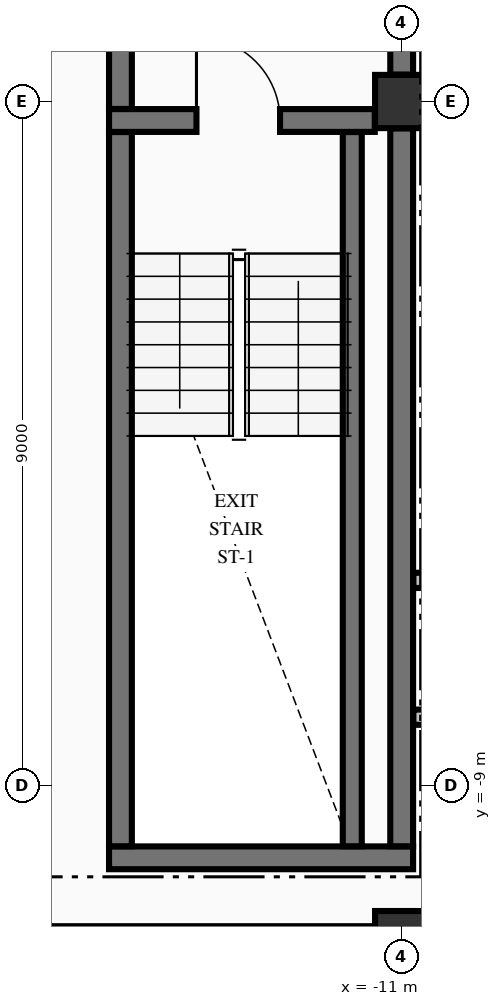
"""IFC4 building model, lengths in metres.
Left out: names, types, materials, properties, quantities, classifications, styles, units other than length and angle.
Written with IfcOpenShell. Run it as: python <this file> out.ifc"""

import sys

from ifc_helpers import new_model, si_unit, direction, frame, frame_2d, origin, origin_2d, place, context, subcontext, project, spatial, rectangle, extrude, element, fill, save


model = new_model("IFC4")
c1 = context("Model", 3, precision=1e-05, world=origin(), true_north=direction((0.0, 1.0)))
c2 = subcontext(c1, "Body", "Model", "MODEL_VIEW")
j1 = project(units=[si_unit("LENGTHUNIT", "METRE"), si_unit("PLANEANGLEUNIT", "RADIAN")], contexts=[c1])
p1 = place(None, origin())
s1 = spatial("IfcSite", under=j1, at=p1, CompositionType="ELEMENT")
p2 = place(p1, origin())
s2 = spatial("IfcBuilding", under=s1, at=p2, CompositionType="ELEMENT")
p3 = place(p2, frame((0.0, 0.0, 287.92)))
s3 = spatial("IfcBuildingStorey", under=s2, at=p3, CompositionType="ELEMENT", Elevation=287.92)
for number, where, z_axis, x_axis in (
    (1, (-11.0, -11.0, -0.325), (0.0, 0.0, 1.0), (1.0, 0.0, 0.0)),
    (2, (-11.0, 0.0, -0.325), (0.0, 0.0, 1.0), (1.0, 0.0, 0.0)),
):
    element("IfcColumn", number, at=place(p3, frame(where, z_axis=z_axis, x_axis=x_axis)), inside=s3, PredefinedType="COLUMN", context=c2, shape_type="SweptSolid", body=[
        extrude(rectangle(XDim=0.7, YDim=0.7, at=origin_2d()), origin(), (0.0, 0.0, 1.0), 3.06),
    ])
p4 = place(p3, frame((-16.62, -11.0, 0.0), z_axis=(0.0, 0.0, 1.0), x_axis=(1.0, 0.0, 0.0)))
e3 = element("IfcWall", 3, at=p4, inside=s3, PredefinedType="STANDARD", context=c2, shape_type="SweptSolid", body=[
    extrude(rectangle(XDim=5.24, YDim=0.3, at=frame_2d((2.62, 0.0))), origin(), (0.0, 0.0, 1.0), 1.077),
])
p5 = place(p3, frame((-14.85, -9.95, 0.0), z_axis=(0.0, 0.0, 1.0), x_axis=(1.0, 0.0, 0.0)))
e4 = element("IfcWall", 4, at=p5, inside=s3, PredefinedType="SHEAR", context=c2, shape_type="SweptSolid", body=[
    extrude(rectangle(XDim=4.0, YDim=0.3, at=frame_2d((2.0, 0.0))), origin(), (0.0, 0.0, 1.0), 2.735),
])
p6 = place(p3, frame((-14.85, -0.25, 0.0), z_axis=(0.0, 0.0, 1.0), x_axis=(1.0, 0.0, 0.0)))
e5 = element("IfcWall", 5, at=p6, inside=s3, PredefinedType="SHEAR", context=c2, shape_type="SweptSolid", body=[
    extrude(rectangle(XDim=3.496, YDim=0.3, at=frame_2d((1.748, 0.0))), origin(), (0.0, 0.0, 1.0), 2.735),
])
p7 = place(p6, frame((1.15, 0.0, 0.0)))
e6 = element("IfcOpeningElement", 6, at=p7, cuts=e5, PredefinedType="OPENING", context=c2, shape_type="SweptSolid", body=[
    extrude(rectangle(XDim=1.1, YDim=2.15, at=frame_2d((0.55, 1.075))), frame((0.0, 0.16, 0.0), z_axis=(0.0, -1.0, 0.0), x_axis=(1.0, 0.0, 0.0)), (0.0, 0.0, 1.0), 0.32),
])
p8 = place(p3, frame((-10.847, -8.1, 0.0), z_axis=(0.0, 0.0, 1.0), x_axis=(1.0, 0.0, 0.0)))
e7 = element("IfcWall", 7, at=p8, inside=s3, PredefinedType="PARTITIONING", context=c2, shape_type="SweptSolid", body=[
    extrude(rectangle(XDim=6.497, YDim=0.2, at=frame_2d((3.249, 0.0))), origin(), (0.0, 0.0, 1.0), 2.735),
])
p9 = place(p3, frame((-10.847, -6.3, 0.0), z_axis=(0.0, 0.0, 1.0), x_axis=(1.0, 0.0, 0.0)))
e8 = element("IfcWall", 8, at=p9, inside=s3, PredefinedType="PARTITIONING", context=c2, shape_type="SweptSolid", body=[
    extrude(rectangle(XDim=6.597, YDim=0.2, at=frame_2d((3.298, 0.0))), origin(), (0.0, 0.0, 1.0), 2.735),
])
p10 = place(p3, frame((-14.7, -9.798, 0.0), z_axis=(0.0, 0.0, 1.0), x_axis=(0.0, 1.0, 0.0)))
e9 = element("IfcWall", 9, at=p10, inside=s3, PredefinedType="SHEAR", context=c2, shape_type="SweptSolid", body=[
    extrude(rectangle(XDim=9.396, YDim=0.3, at=frame_2d((4.698, 0.0))), origin(), (0.0, 0.0, 1.0), 2.735),
])
p11 = place(p3, frame((-14.7, -0.098, 0.0), z_axis=(0.0, 0.0, 1.0), x_axis=(0.0, 1.0, 0.0)))
e10 = element("IfcWall", 10, at=p11, inside=s3, PredefinedType="SHEAR", context=c2, shape_type="SweptSolid", body=[
    extrude(rectangle(XDim=2.846, YDim=0.3, at=frame_2d((1.423, 0.0))), origin(), (0.0, 0.0, 1.0), 2.735),
])
p12 = place(p3, frame((-11.65, -9.798, 0.0), z_axis=(0.0, 0.0, 1.0), x_axis=(0.0, 1.0, 0.0)))
e11 = element("IfcWall", 11, at=p12, inside=s3, PredefinedType="SOLIDWALL", context=c2, shape_type="SweptSolid", body=[
    extrude(rectangle(XDim=9.396, YDim=0.25, at=frame_2d((4.698, 0.0))), origin(), (0.0, 0.0, 1.0), 2.735),
])
p13 = place(p3, frame((-11.0, -9.798, 0.0), z_axis=(0.0, 0.0, 1.0), x_axis=(0.0, 1.0, 0.0)))
e12 = element("IfcWall", 12, at=p13, inside=s3, PredefinedType="SHEAR", context=c2, shape_type="SweptSolid", body=[
    extrude(rectangle(XDim=9.444, YDim=0.3, at=frame_2d((4.722, 0.0))), origin(), (0.0, 0.0, 1.0), 2.735),
])
p14 = place(p3, frame((-11.0, 0.354, 0.0), z_axis=(0.0, 0.0, 1.0), x_axis=(0.0, 1.0, 0.0)))
e13 = element("IfcWall", 13, at=p14, inside=s3, PredefinedType="SHEAR", context=c2, shape_type="SweptSolid", body=[
    extrude(rectangle(XDim=2.394, YDim=0.3, at=frame_2d((1.197, 0.0))), origin(), (0.0, 0.0, 1.0), 2.735),
])
p15 = place(p14, frame((0.746, 0.0, 0.0)))
e14 = element("IfcOpeningElement", 14, at=p15, cuts=e13, PredefinedType="OPENING", context=c2, shape_type="SweptSolid", body=[
    extrude(rectangle(XDim=1.1, YDim=2.15, at=frame_2d((0.55, 1.075))), frame((0.0, 0.16, 0.0), z_axis=(0.0, -1.0, 0.0), x_axis=(1.0, 0.0, 0.0)), (0.0, 0.0, 1.0), 0.32),
])
p16 = place(p7, origin())
e15 = element("IfcDoor", 15, at=p16, inside=s3, OperationType="SINGLE_SWING_LEFT", PredefinedType="DOOR", context=c2, shape_type="SweptSolid", body=[
    extrude(rectangle(XDim=1.1, YDim=2.15, at=frame_2d((0.55, 1.075))), frame((0.0, 0.025, 0.0), z_axis=(0.0, -1.0, 0.0), x_axis=(1.0, 0.0, 0.0)), (0.0, 0.0, 1.0), 0.05),
])
fill(e6, e15)
save(model, sys.argv[1])
